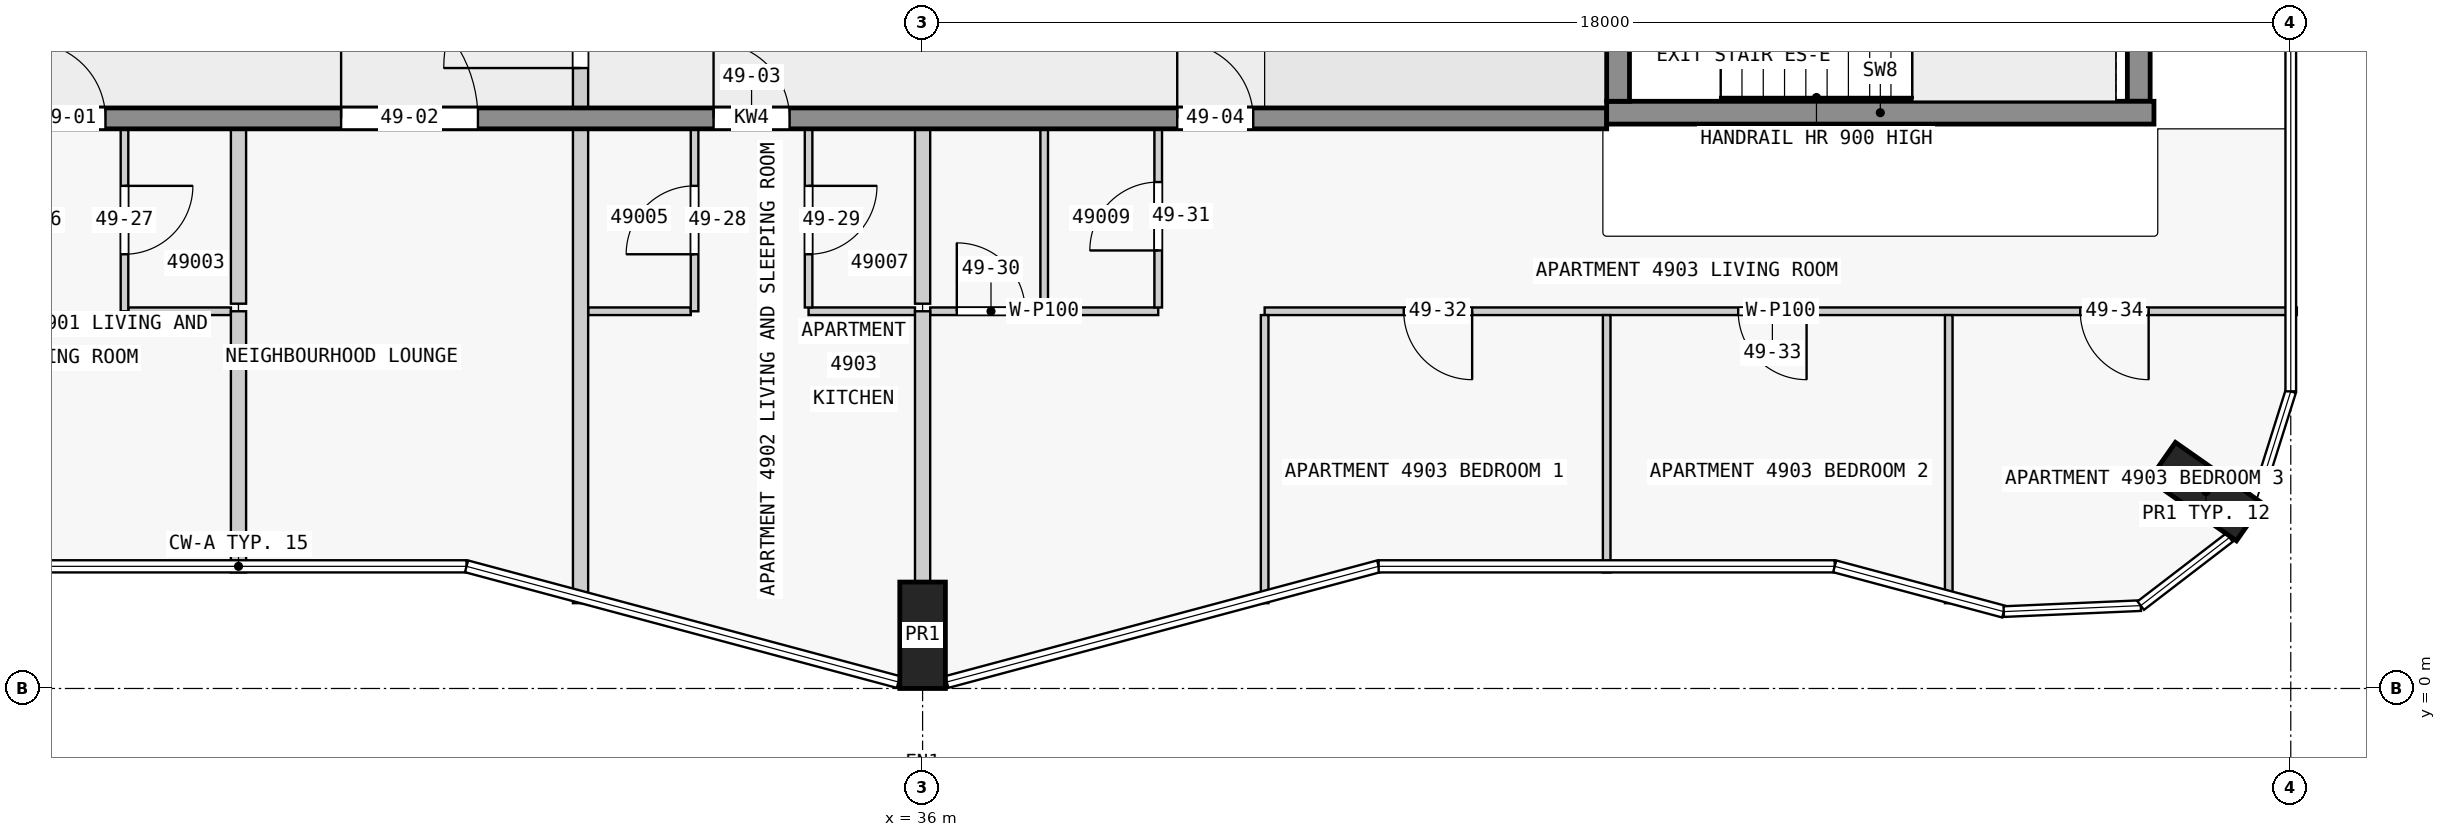
"""IFC4 building model, lengths in metres.
Left out: names, types, materials, properties, quantities, classifications, styles, units other than length and angle.
Written with IfcOpenShell. Run it as: python <this file> out.ifc"""

import sys

from ifc_helpers import new_model, si_unit, direction, frame, frame_2d, origin, origin_2d, place, context, subcontext, project, spatial, rectangle, extrude, element, fill, save


model = new_model("IFC4")
c1 = context("Model", 3, precision=1e-05, world=origin(), true_north=direction((0.0, 1.0)))
c2 = subcontext(c1, "Body", "Model", "MODEL_VIEW")
j1 = project(units=[si_unit("LENGTHUNIT", "METRE"), si_unit("PLANEANGLEUNIT", "RADIAN")], contexts=[c1])
p1 = place(None, origin())
s1 = spatial("IfcSite", under=j1, at=p1, CompositionType="ELEMENT")
p2 = place(p1, origin())
s2 = spatial("IfcBuilding", under=s1, at=p2, CompositionType="ELEMENT")
p3 = place(p2, frame((0.0, 0.0, 190.9)))
s3 = spatial("IfcBuildingStorey", under=s2, at=p3, CompositionType="ELEMENT", Elevation=190.9)
for number, where, z_axis, x_axis in (
    (1, (36.0, 0.7, 0.0), (0.0, 0.0, 1.0), (1.0, 0.0, 0.0)),
    (2, (52.884, 2.59, 0.0), (0.0, 0.0, 1.0), (0.574, 0.819, 0.0)),
):
    element("IfcColumn", number, at=place(p3, frame(where, z_axis=z_axis, x_axis=x_axis)), inside=s3, PredefinedType="COLUMN", context=c2, shape_type="SweptSolid", body=[
        extrude(rectangle(XDim=0.6, YDim=1.4, at=origin_2d()), origin(), (0.0, 0.0, 1.0), 3.5),
    ])
p4 = place(p3, frame((45.15, 7.725, 0.0), z_axis=(0.0, 0.0, 1.0), x_axis=(0.0, 1.0, 0.0)))
e3 = element("IfcWall", 3, at=p4, inside=s3, PredefinedType="SHEAR", context=c2, shape_type="SweptSolid", body=[
    extrude(rectangle(XDim=2.55, YDim=0.3, at=frame_2d((1.275, 0.0))), origin(), (0.0, 0.0, 1.0), 3.5),
])
p5 = place(p4, frame((0.725, 0.0, 0.0)))
e4 = element("IfcOpeningElement", 4, at=p5, cuts=e3, PredefinedType="OPENING", context=c2, shape_type="SweptSolid", body=[
    extrude(rectangle(XDim=1.1, YDim=2.1, at=frame_2d((0.55, 1.05))), frame((0.0, 0.16, 0.0), z_axis=(0.0, -1.0, 0.0), x_axis=(1.0, 0.0, 0.0)), (0.0, 0.0, 1.0), 0.32),
])
p6 = place(p3, frame((52.0, 7.725, 0.0), z_axis=(0.0, 0.0, 1.0), x_axis=(0.0, 1.0, 0.0)))
e5 = element("IfcWall", 5, at=p6, inside=s3, PredefinedType="SHEAR", context=c2, shape_type="SweptSolid", body=[
    extrude(rectangle(XDim=2.55, YDim=0.3, at=frame_2d((1.275, 0.0))), origin(), (0.0, 0.0, 1.0), 3.5),
])
p7 = place(p3, frame((45.0, 7.575, 0.0), z_axis=(0.0, 0.0, 1.0), x_axis=(1.0, 0.0, 0.0)))
e6 = element("IfcWall", 6, at=p7, inside=s3, PredefinedType="SHEAR", context=c2, shape_type="SweptSolid", body=[
    extrude(rectangle(XDim=7.2, YDim=0.3, at=frame_2d((3.6, 0.0))), origin(), (0.0, 0.0, 1.0), 3.5),
])
p8 = place(p3, frame((22.5, 7.5, 0.0), z_axis=(0.0, 0.0, 1.0), x_axis=(1.0, 0.0, 0.0)))
e7 = element("IfcWall", 7, at=p8, inside=s3, PredefinedType="SHEAR", context=c2, shape_type="SweptSolid", body=[
    extrude(rectangle(XDim=22.5, YDim=0.275, at=frame_2d((11.25, 0.0))), origin(), (0.0, 0.0, 1.0), 3.25),
])
p9 = place(p8, frame((1.75, 0.0, 0.0)))
e8 = element("IfcOpeningElement", 8, at=p9, cuts=e7, PredefinedType="OPENING", context=c2, shape_type="SweptSolid", body=[
    extrude(rectangle(XDim=1.0, YDim=2.1, at=frame_2d((0.5, 1.05))), frame((0.0, 0.147, 0.0), z_axis=(0.0, -1.0, 0.0), x_axis=(1.0, 0.0, 0.0)), (0.0, 0.0, 1.0), 0.295),
])
p10 = place(p8, frame((5.85, 0.0, 0.0)))
e9 = element("IfcOpeningElement", 9, at=p10, cuts=e7, PredefinedType="OPENING", context=c2, shape_type="SweptSolid", body=[
    extrude(rectangle(XDim=1.8, YDim=2.1, at=frame_2d((0.9, 1.05))), frame((0.0, 0.147, 0.0), z_axis=(0.0, -1.0, 0.0), x_axis=(1.0, 0.0, 0.0)), (0.0, 0.0, 1.0), 0.295),
])
p11 = place(p8, frame((10.75, 0.0, 0.0)))
e10 = element("IfcOpeningElement", 10, at=p11, cuts=e7, PredefinedType="OPENING", context=c2, shape_type="SweptSolid", body=[
    extrude(rectangle(XDim=1.0, YDim=2.1, at=frame_2d((0.5, 1.05))), frame((0.0, 0.147, 0.0), z_axis=(0.0, -1.0, 0.0), x_axis=(1.0, 0.0, 0.0)), (0.0, 0.0, 1.0), 0.295),
])
p12 = place(p8, frame((16.85, 0.0, 0.0)))
e11 = element("IfcOpeningElement", 11, at=p12, cuts=e7, PredefinedType="OPENING", context=c2, shape_type="SweptSolid", body=[
    extrude(rectangle(XDim=1.0, YDim=2.1, at=frame_2d((0.5, 1.05))), frame((0.0, 0.147, 0.0), z_axis=(0.0, -1.0, 0.0), x_axis=(1.0, 0.0, 0.0)), (0.0, 0.0, 1.0), 0.295),
])
p13 = place(p3, frame((54.08, 4.962, 0.0), z_axis=(0.0, 0.0, 1.0), x_axis=(-1.0, 0.0, 0.0)))
e12 = element("IfcWall", 12, at=p13, inside=s3, PredefinedType="PARTITIONING", context=c2, shape_type="SweptSolid", body=[
    extrude(rectangle(XDim=13.58, YDim=0.1, at=frame_2d((6.79, 0.0))), origin(), (0.0, 0.0, 1.0), 3.25),
])
p14 = place(p13, frame((10.85, 0.0, 0.0)))
e13 = element("IfcOpeningElement", 13, at=p14, cuts=e12, PredefinedType="OPENING", context=c2, shape_type="SweptSolid", body=[
    extrude(rectangle(XDim=0.9, YDim=2.1, at=frame_2d((0.45, 1.05))), frame((0.0, 0.06, 0.0), z_axis=(0.0, -1.0, 0.0), x_axis=(1.0, 0.0, 0.0)), (0.0, 0.0, 1.0), 0.12),
])
p15 = place(p13, frame((6.45, 0.0, 0.0)))
e14 = element("IfcOpeningElement", 14, at=p15, cuts=e12, PredefinedType="OPENING", context=c2, shape_type="SweptSolid", body=[
    extrude(rectangle(XDim=0.9, YDim=2.1, at=frame_2d((0.45, 1.05))), frame((0.0, 0.06, 0.0), z_axis=(0.0, -1.0, 0.0), x_axis=(1.0, 0.0, 0.0)), (0.0, 0.0, 1.0), 0.12),
])
p16 = place(p13, frame((1.95, 0.0, 0.0)))
e15 = element("IfcOpeningElement", 15, at=p16, cuts=e12, PredefinedType="OPENING", context=c2, shape_type="SweptSolid", body=[
    extrude(rectangle(XDim=0.9, YDim=2.1, at=frame_2d((0.45, 1.05))), frame((0.0, 0.06, 0.0), z_axis=(0.0, -1.0, 0.0), x_axis=(1.0, 0.0, 0.0)), (0.0, 0.0, 1.0), 0.12),
])
for number, where, z_axis, x_axis in (
    (16, (25.55, 4.962, 0.0), (0.0, 0.0, 1.0), (1.0, 0.0, 0.0)),
    (17, (31.6, 4.962, 0.0), (0.0, 0.0, 1.0), (1.0, 0.0, 0.0)),
):
    element("IfcWall", number, at=place(p3, frame(where, z_axis=z_axis, x_axis=x_axis)), inside=s3, PredefinedType="PARTITIONING", context=c2, shape_type="SweptSolid", body=[
        extrude(rectangle(XDim=1.35, YDim=0.1, at=frame_2d((0.675, 0.0))), origin(), (0.0, 0.0, 1.0), 3.25),
    ])
p17 = place(p3, frame((34.5, 4.962, 0.0), z_axis=(0.0, 0.0, 1.0), x_axis=(1.0, 0.0, 0.0)))
e18 = element("IfcWall", 18, at=p17, inside=s3, PredefinedType="PARTITIONING", context=c2, shape_type="SweptSolid", body=[
    extrude(rectangle(XDim=1.4, YDim=0.1, at=frame_2d((0.7, 0.0))), origin(), (0.0, 0.0, 1.0), 3.25),
])
p18 = place(p3, frame((36.1, 4.962, 0.0), z_axis=(0.0, 0.0, 1.0), x_axis=(1.0, 0.0, 0.0)))
e19 = element("IfcWall", 19, at=p18, inside=s3, PredefinedType="PARTITIONING", context=c2, shape_type="SweptSolid", body=[
    extrude(rectangle(XDim=3.0, YDim=0.1, at=frame_2d((1.5, 0.0))), origin(), (0.0, 0.0, 1.0), 3.25),
])
p19 = place(p18, frame((0.35, 0.0, 0.0)))
e20 = element("IfcOpeningElement", 20, at=p19, cuts=e19, PredefinedType="OPENING", context=c2, shape_type="SweptSolid", body=[
    extrude(rectangle(XDim=0.9, YDim=2.1, at=frame_2d((0.45, 1.05))), frame((0.0, 0.06, 0.0), z_axis=(0.0, -1.0, 0.0), x_axis=(1.0, 0.0, 0.0)), (0.0, 0.0, 1.0), 0.12),
])
p20 = place(p3, frame((25.5, 7.363, 0.0), z_axis=(0.0, 0.0, 1.0), x_axis=(0.0, -1.0, 0.0)))
e21 = element("IfcWall", 21, at=p20, inside=s3, PredefinedType="PARTITIONING", context=c2, shape_type="SweptSolid", body=[
    extrude(rectangle(XDim=2.4, YDim=0.1, at=frame_2d((1.2, 0.0))), origin(), (0.0, 0.0, 1.0), 3.25),
])
p21 = place(p20, frame((0.75, 0.0, 0.0)))
e22 = element("IfcOpeningElement", 22, at=p21, cuts=e21, PredefinedType="OPENING", context=c2, shape_type="SweptSolid", body=[
    extrude(rectangle(XDim=0.9, YDim=2.1, at=frame_2d((0.45, 1.05))), frame((0.0, 0.06, 0.0), z_axis=(0.0, -1.0, 0.0), x_axis=(1.0, 0.0, 0.0)), (0.0, 0.0, 1.0), 0.12),
])
p22 = place(p3, frame((27.0, 4.962, 0.0), z_axis=(0.0, 0.0, 1.0), x_axis=(0.0, -1.0, 0.0)))
e23 = element("IfcWall", 23, at=p22, inside=s3, PredefinedType="PARTITIONING", context=c2, shape_type="SweptSolid", body=[
    extrude(rectangle(XDim=3.436, YDim=0.2, at=frame_2d((1.718, 0.0))), origin(), (0.0, 0.0, 1.0), 3.25),
])
p23 = place(p3, frame((27.0, 5.062, 0.0), z_axis=(0.0, 0.0, 1.0), x_axis=(0.0, 1.0, 0.0)))
e24 = element("IfcWall", 24, at=p23, inside=s3, PredefinedType="PARTITIONING", context=c2, shape_type="SweptSolid", body=[
    extrude(rectangle(XDim=2.3, YDim=0.2, at=frame_2d((1.15, 0.0))), origin(), (0.0, 0.0, 1.0), 3.25),
])
p24 = place(p3, frame((31.5, 1.122, 0.0), z_axis=(0.0, 0.0, 1.0), x_axis=(0.0, 1.0, 0.0)))
e25 = element("IfcWall", 25, at=p24, inside=s3, PredefinedType="PARTITIONING", context=c2, shape_type="SweptSolid", body=[
    extrude(rectangle(XDim=6.24, YDim=0.2, at=frame_2d((3.12, 0.0))), origin(), (0.0, 0.0, 1.0), 3.25),
])
p25 = place(p3, frame((33.0, 4.962, 0.0), z_axis=(0.0, 0.0, 1.0), x_axis=(0.0, 1.0, 0.0)))
e26 = element("IfcWall", 26, at=p25, inside=s3, PredefinedType="PARTITIONING", context=c2, shape_type="SweptSolid", body=[
    extrude(rectangle(XDim=2.4, YDim=0.1, at=frame_2d((1.2, 0.0))), origin(), (0.0, 0.0, 1.0), 3.25),
])
p26 = place(p25, frame((0.75, 0.0, 0.0)))
e27 = element("IfcOpeningElement", 27, at=p26, cuts=e26, PredefinedType="OPENING", context=c2, shape_type="SweptSolid", body=[
    extrude(rectangle(XDim=0.9, YDim=2.1, at=frame_2d((0.45, 1.05))), frame((0.0, 0.06, 0.0), z_axis=(0.0, -1.0, 0.0), x_axis=(1.0, 0.0, 0.0)), (0.0, 0.0, 1.0), 0.12),
])
p27 = place(p3, frame((34.5, 7.363, 0.0), z_axis=(0.0, 0.0, 1.0), x_axis=(0.0, -1.0, 0.0)))
e28 = element("IfcWall", 28, at=p27, inside=s3, PredefinedType="PARTITIONING", context=c2, shape_type="SweptSolid", body=[
    extrude(rectangle(XDim=2.35, YDim=0.1, at=frame_2d((1.175, 0.0))), origin(), (0.0, 0.0, 1.0), 3.25),
])
p28 = place(p27, frame((0.75, 0.0, 0.0)))
e29 = element("IfcOpeningElement", 29, at=p28, cuts=e28, PredefinedType="OPENING", context=c2, shape_type="SweptSolid", body=[
    extrude(rectangle(XDim=0.9, YDim=2.1, at=frame_2d((0.45, 1.05))), frame((0.0, 0.06, 0.0), z_axis=(0.0, -1.0, 0.0), x_axis=(1.0, 0.0, 0.0)), (0.0, 0.0, 1.0), 0.12),
])
p29 = place(p3, frame((36.0, 4.962, 0.0), z_axis=(0.0, 0.0, 1.0), x_axis=(0.0, -1.0, 0.0)))
e30 = element("IfcWall", 30, at=p29, inside=s3, PredefinedType="PARTITIONING", context=c2, shape_type="SweptSolid", body=[
    extrude(rectangle(XDim=3.562, YDim=0.2, at=frame_2d((1.781, 0.0))), origin(), (0.0, 0.0, 1.0), 3.25),
])
p30 = place(p3, frame((36.0, 5.062, 0.0), z_axis=(0.0, 0.0, 1.0), x_axis=(0.0, 1.0, 0.0)))
e31 = element("IfcWall", 31, at=p30, inside=s3, PredefinedType="PARTITIONING", context=c2, shape_type="SweptSolid", body=[
    extrude(rectangle(XDim=2.3, YDim=0.2, at=frame_2d((1.15, 0.0))), origin(), (0.0, 0.0, 1.0), 3.25),
])
p31 = place(p3, frame((37.6, 5.012, 0.0), z_axis=(0.0, 0.0, 1.0), x_axis=(0.0, 1.0, 0.0)))
e32 = element("IfcWall", 32, at=p31, inside=s3, PredefinedType="PARTITIONING", context=c2, shape_type="SweptSolid", body=[
    extrude(rectangle(XDim=2.35, YDim=0.1, at=frame_2d((1.175, 0.0))), origin(), (0.0, 0.0, 1.0), 3.25),
])
p32 = place(p3, frame((39.1, 5.012, 0.0), z_axis=(0.0, 0.0, 1.0), x_axis=(0.0, 1.0, 0.0)))
e33 = element("IfcWall", 33, at=p32, inside=s3, PredefinedType="PARTITIONING", context=c2, shape_type="SweptSolid", body=[
    extrude(rectangle(XDim=2.35, YDim=0.1, at=frame_2d((1.175, 0.0))), origin(), (0.0, 0.0, 1.0), 3.25),
])
p33 = place(p32, frame((0.75, 0.0, 0.0)))
e34 = element("IfcOpeningElement", 34, at=p33, cuts=e33, PredefinedType="OPENING", context=c2, shape_type="SweptSolid", body=[
    extrude(rectangle(XDim=0.9, YDim=2.1, at=frame_2d((0.45, 1.05))), frame((0.0, 0.06, 0.0), z_axis=(0.0, -1.0, 0.0), x_axis=(1.0, 0.0, 0.0)), (0.0, 0.0, 1.0), 0.12),
])
p34 = place(p3, frame((40.5, 4.913, 0.0), z_axis=(0.0, 0.0, 1.0), x_axis=(0.0, -1.0, 0.0)))
e35 = element("IfcWall", 35, at=p34, inside=s3, PredefinedType="PARTITIONING", context=c2, shape_type="SweptSolid", body=[
    extrude(rectangle(XDim=3.79, YDim=0.1, at=frame_2d((1.895, 0.0))), origin(), (0.0, 0.0, 1.0), 3.25),
])
p35 = place(p3, frame((45.0, 1.527, 0.0), z_axis=(0.0, 0.0, 1.0), x_axis=(0.0, 1.0, 0.0)))
e36 = element("IfcWall", 36, at=p35, inside=s3, PredefinedType="PARTITIONING", context=c2, shape_type="SweptSolid", body=[
    extrude(rectangle(XDim=3.386, YDim=0.1, at=frame_2d((1.693, 0.0))), origin(), (0.0, 0.0, 1.0), 3.25),
])
p36 = place(p3, frame((49.5, 1.122, 0.0), z_axis=(0.0, 0.0, 1.0), x_axis=(0.0, 1.0, 0.0)))
e37 = element("IfcWall", 37, at=p36, inside=s3, PredefinedType="PARTITIONING", context=c2, shape_type="SweptSolid", body=[
    extrude(rectangle(XDim=3.79, YDim=0.1, at=frame_2d((1.895, 0.0))), origin(), (0.0, 0.0, 1.0), 3.25),
])
p37 = place(p3, frame((31.5, 7.462, 0.0), z_axis=(0.0, 0.0, 1.0), x_axis=(0.0, 1.0, 0.0)))
e38 = element("IfcWall", 38, at=p37, inside=s3, PredefinedType="PARTITIONING", context=c2, shape_type="SweptSolid", body=[
    extrude(rectangle(XDim=3.175, YDim=0.2, at=frame_2d((1.587, 0.0))), origin(), (0.0, 0.0, 1.0), 3.25),
])
p38 = place(p37, frame((0.7, 0.0, 0.0)))
e39 = element("IfcOpeningElement", 39, at=p38, cuts=e38, PredefinedType="OPENING", context=c2, shape_type="SweptSolid", body=[
    extrude(rectangle(XDim=1.8, YDim=2.1, at=frame_2d((0.9, 1.05))), frame((0.0, 0.11, 0.0), z_axis=(0.0, -1.0, 0.0), x_axis=(1.0, 0.0, 0.0)), (0.0, 0.0, 1.0), 0.22),
])
p39 = place(p9, origin())
e40 = element("IfcDoor", 40, at=p39, inside=s3, OperationType="SINGLE_SWING_LEFT", PredefinedType="DOOR", context=c2, shape_type="SweptSolid", body=[
    extrude(rectangle(XDim=1.0, YDim=2.1, at=frame_2d((0.5, 1.05))), frame((0.0, 0.025, 0.0), z_axis=(0.0, -1.0, 0.0), x_axis=(1.0, 0.0, 0.0)), (0.0, 0.0, 1.0), 0.05),
])
fill(e8, e40)
p40 = place(p10, origin())
e41 = element("IfcDoor", 41, at=p40, inside=s3, OperationType="SINGLE_SWING_LEFT", PredefinedType="DOOR", context=c2, shape_type="SweptSolid", body=[
    extrude(rectangle(XDim=1.8, YDim=2.1, at=frame_2d((0.9, 1.05))), frame((0.0, 0.025, 0.0), z_axis=(0.0, -1.0, 0.0), x_axis=(1.0, 0.0, 0.0)), (0.0, 0.0, 1.0), 0.05),
])
fill(e9, e41)
p41 = place(p11, origin())
e42 = element("IfcDoor", 42, at=p41, inside=s3, OperationType="SINGLE_SWING_LEFT", PredefinedType="DOOR", context=c2, shape_type="SweptSolid", body=[
    extrude(rectangle(XDim=1.0, YDim=2.1, at=frame_2d((0.5, 1.05))), frame((0.0, 0.025, 0.0), z_axis=(0.0, -1.0, 0.0), x_axis=(1.0, 0.0, 0.0)), (0.0, 0.0, 1.0), 0.05),
])
fill(e10, e42)
p42 = place(p12, origin())
e43 = element("IfcDoor", 43, at=p42, inside=s3, OperationType="SINGLE_SWING_RIGHT", PredefinedType="DOOR", context=c2, shape_type="SweptSolid", body=[
    extrude(rectangle(XDim=1.0, YDim=2.1, at=frame_2d((0.5, 1.05))), frame((0.0, 0.025, 0.0), z_axis=(0.0, -1.0, 0.0), x_axis=(1.0, 0.0, 0.0)), (0.0, 0.0, 1.0), 0.05),
])
fill(e11, e43)
p43 = place(p38, origin())
e44 = element("IfcDoor", 44, at=p43, inside=s3, OperationType="SINGLE_SWING_RIGHT", PredefinedType="DOOR", context=c2, shape_type="SweptSolid", body=[
    extrude(rectangle(XDim=1.8, YDim=2.1, at=frame_2d((0.9, 1.05))), frame((0.0, 0.025, 0.0), z_axis=(0.0, -1.0, 0.0), x_axis=(1.0, 0.0, 0.0)), (0.0, 0.0, 1.0), 0.05),
])
fill(e39, e44)
p44 = place(p21, origin())
e45 = element("IfcDoor", 45, at=p44, inside=s3, OperationType="SINGLE_SWING_RIGHT", PredefinedType="DOOR", context=c2, shape_type="SweptSolid", body=[
    extrude(rectangle(XDim=0.9, YDim=2.1, at=frame_2d((0.45, 1.05))), frame((0.0, 0.025, 0.0), z_axis=(0.0, -1.0, 0.0), x_axis=(1.0, 0.0, 0.0)), (0.0, 0.0, 1.0), 0.05),
])
fill(e22, e45)
p45 = place(p26, origin())
e46 = element("IfcDoor", 46, at=p45, inside=s3, OperationType="SINGLE_SWING_RIGHT", PredefinedType="DOOR", context=c2, shape_type="SweptSolid", body=[
    extrude(rectangle(XDim=0.9, YDim=2.1, at=frame_2d((0.45, 1.05))), frame((0.0, 0.025, 0.0), z_axis=(0.0, -1.0, 0.0), x_axis=(1.0, 0.0, 0.0)), (0.0, 0.0, 1.0), 0.05),
])
fill(e27, e46)
p46 = place(p28, origin())
e47 = element("IfcDoor", 47, at=p46, inside=s3, OperationType="SINGLE_SWING_RIGHT", PredefinedType="DOOR", context=c2, shape_type="SweptSolid", body=[
    extrude(rectangle(XDim=0.9, YDim=2.1, at=frame_2d((0.45, 1.05))), frame((0.0, 0.025, 0.0), z_axis=(0.0, -1.0, 0.0), x_axis=(1.0, 0.0, 0.0)), (0.0, 0.0, 1.0), 0.05),
])
fill(e29, e47)
p47 = place(p19, origin())
e48 = element("IfcDoor", 48, at=p47, inside=s3, OperationType="SINGLE_SWING_LEFT", PredefinedType="DOOR", context=c2, shape_type="SweptSolid", body=[
    extrude(rectangle(XDim=0.9, YDim=2.1, at=frame_2d((0.45, 1.05))), frame((0.0, 0.025, 0.0), z_axis=(0.0, -1.0, 0.0), x_axis=(1.0, 0.0, 0.0)), (0.0, 0.0, 1.0), 0.05),
])
fill(e20, e48)
p48 = place(p33, origin())
e49 = element("IfcDoor", 49, at=p48, inside=s3, OperationType="SINGLE_SWING_RIGHT", PredefinedType="DOOR", context=c2, shape_type="SweptSolid", body=[
    extrude(rectangle(XDim=0.9, YDim=2.1, at=frame_2d((0.45, 1.05))), frame((0.0, 0.025, 0.0), z_axis=(0.0, -1.0, 0.0), x_axis=(1.0, 0.0, 0.0)), (0.0, 0.0, 1.0), 0.05),
])
fill(e34, e49)
p49 = place(p14, origin())
e50 = element("IfcDoor", 50, at=p49, inside=s3, OperationType="SINGLE_SWING_RIGHT", PredefinedType="DOOR", context=c2, shape_type="SweptSolid", body=[
    extrude(rectangle(XDim=0.9, YDim=2.1, at=frame_2d((0.45, 1.05))), frame((0.0, 0.025, 0.0), z_axis=(0.0, -1.0, 0.0), x_axis=(1.0, 0.0, 0.0)), (0.0, 0.0, 1.0), 0.05),
])
fill(e13, e50)
p50 = place(p15, origin())
e51 = element("IfcDoor", 51, at=p50, inside=s3, OperationType="SINGLE_SWING_RIGHT", PredefinedType="DOOR", context=c2, shape_type="SweptSolid", body=[
    extrude(rectangle(XDim=0.9, YDim=2.1, at=frame_2d((0.45, 1.05))), frame((0.0, 0.025, 0.0), z_axis=(0.0, -1.0, 0.0), x_axis=(1.0, 0.0, 0.0)), (0.0, 0.0, 1.0), 0.05),
])
fill(e14, e51)
p51 = place(p16, origin())
e52 = element("IfcDoor", 52, at=p51, inside=s3, OperationType="SINGLE_SWING_LEFT", PredefinedType="DOOR", context=c2, shape_type="SweptSolid", body=[
    extrude(rectangle(XDim=0.9, YDim=2.1, at=frame_2d((0.45, 1.05))), frame((0.0, 0.025, 0.0), z_axis=(0.0, -1.0, 0.0), x_axis=(1.0, 0.0, 0.0)), (0.0, 0.0, 1.0), 0.05),
])
fill(e15, e52)
save(model, sys.argv[1])
